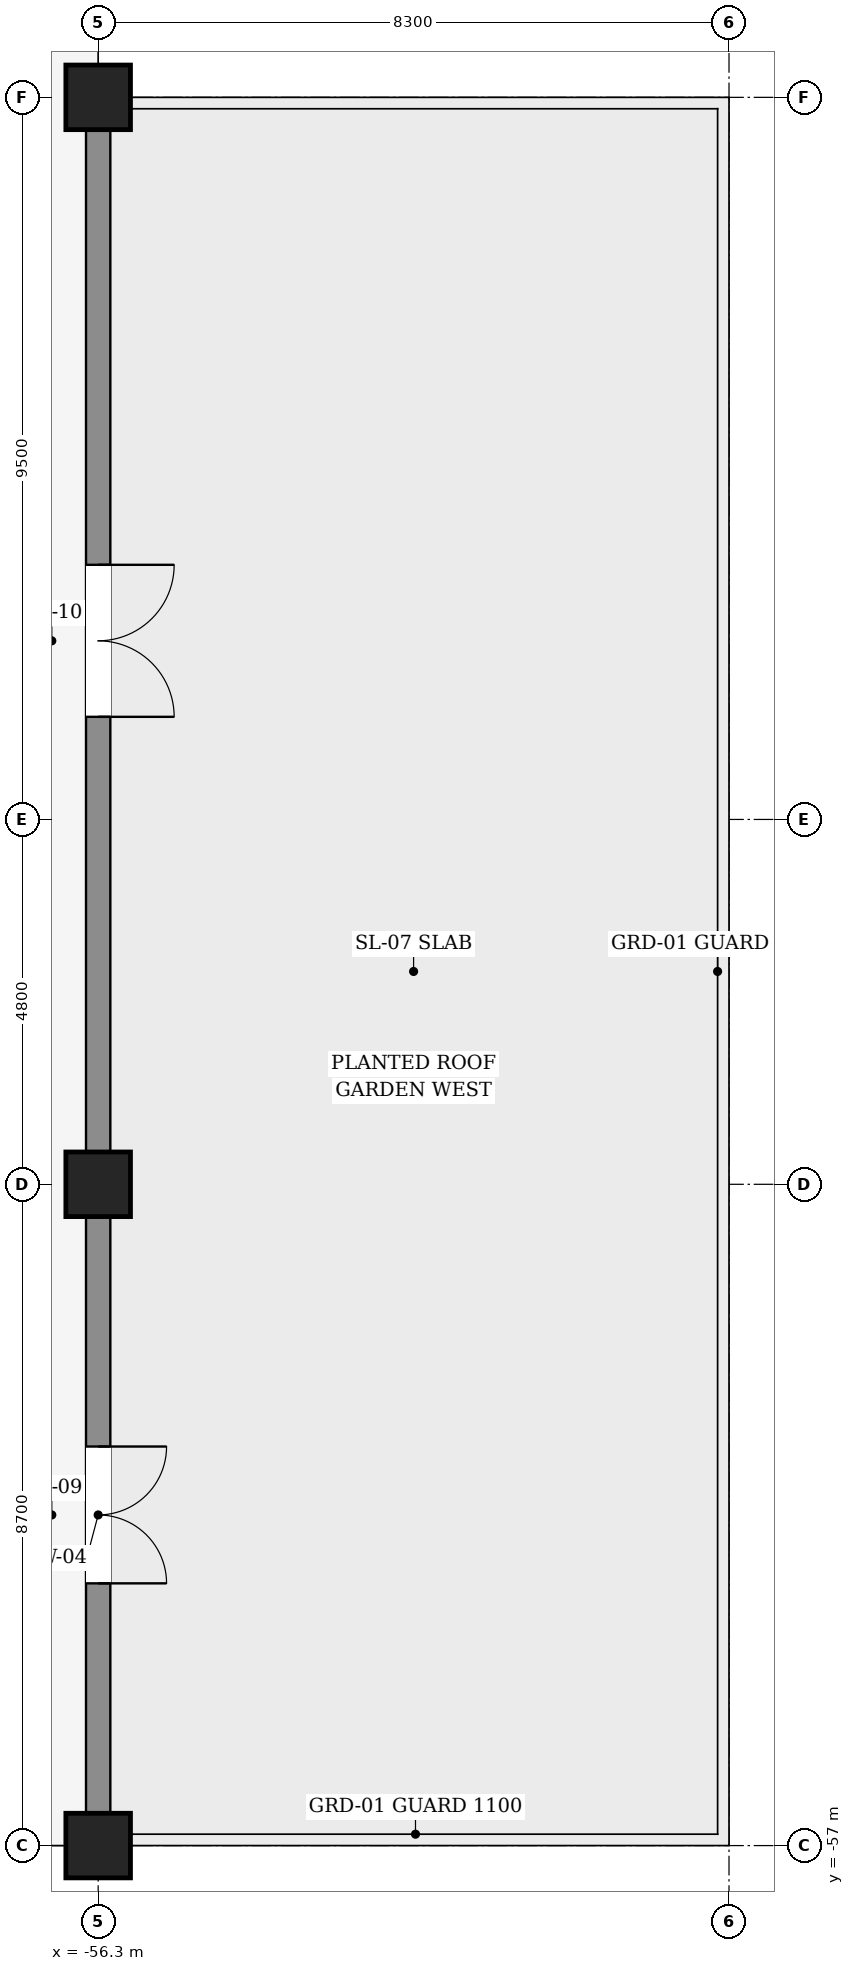
"""IFC4 building model, lengths in metres.
Left out: names, types, materials, properties, quantities, classifications, styles, units other than length and angle.
Written with IfcOpenShell. Run it as: python <this file> out.ifc"""

import sys

from ifc_helpers import new_model, si_unit, direction, frame, frame_2d, origin, origin_2d, place, context, subcontext, project, spatial, rectangle, extrude, element, fill, save


model = new_model("IFC4")
c1 = context("Model", 3, precision=1e-05, world=origin(), true_north=direction((0.0, 1.0)))
c2 = subcontext(c1, "Body", "Model", "MODEL_VIEW")
j1 = project(units=[si_unit("LENGTHUNIT", "METRE"), si_unit("PLANEANGLEUNIT", "RADIAN")], contexts=[c1])
p1 = place(None, origin())
s1 = spatial("IfcSite", under=j1, at=p1, CompositionType="ELEMENT")
p2 = place(p1, origin())
s2 = spatial("IfcBuilding", under=s1, at=p2, CompositionType="ELEMENT")
p3 = place(p2, frame((0.0, 0.0, 16.2)))
s3 = spatial("IfcBuildingStorey", under=s2, at=p3, CompositionType="ELEMENT", Elevation=16.2)
for number, where, z_axis, x_axis in (
    (1, (-56.3, -57.0, 0.0), (0.0, 0.0, 1.0), (1.0, 0.0, 0.0)),
    (2, (-56.3, -48.3, 0.0), (0.0, 0.0, 1.0), (1.0, 0.0, 0.0)),
    (3, (-56.3, -34.0, 0.0), (0.0, 0.0, 1.0), (1.0, 0.0, 0.0)),
):
    element("IfcColumn", number, at=place(p3, frame(where, z_axis=z_axis, x_axis=x_axis)), inside=s3, PredefinedType="COLUMN", context=c2, shape_type="SweptSolid", body=[
        extrude(rectangle(XDim=0.85, YDim=0.85, at=origin_2d()), origin(), (0.0, 0.0, 1.0), 4.8),
    ])
p4 = place(p3, frame((-56.3, -48.707, 0.0), z_axis=(0.0, 0.0, 1.0), x_axis=(0.0, -1.0, 0.0)))
e4 = element("IfcWall", 4, at=p4, inside=s3, PredefinedType="SOLIDWALL", context=c2, shape_type="SweptSolid", body=[
    extrude(rectangle(XDim=7.886, YDim=0.32, at=frame_2d((3.943, 0.0))), origin(), (0.0, 0.0, 1.0), 3.8),
])
p5 = place(p4, frame((3.043, 0.0, 0.0)))
e5 = element("IfcOpeningElement", 5, at=p5, cuts=e4, PredefinedType="OPENING", context=c2, shape_type="SweptSolid", body=[
    extrude(rectangle(XDim=1.8, YDim=2.4, at=frame_2d((0.9, 1.2))), frame((0.0, 0.17, 0.0), z_axis=(0.0, -1.0, 0.0), x_axis=(1.0, 0.0, 0.0)), (0.0, 0.0, 1.0), 0.34),
])
p6 = place(p3, frame((-56.3, -34.407, 0.0), z_axis=(0.0, 0.0, 1.0), x_axis=(0.0, -1.0, 0.0)))
e6 = element("IfcWall", 6, at=p6, inside=s3, PredefinedType="SOLIDWALL", context=c2, shape_type="SweptSolid", body=[
    extrude(rectangle(XDim=13.486, YDim=0.32, at=frame_2d((6.743, 0.0))), origin(), (0.0, 0.0, 1.0), 3.977),
])
p7 = place(p6, frame((5.743, 0.0, 0.0)))
e7 = element("IfcOpeningElement", 7, at=p7, cuts=e6, PredefinedType="OPENING", context=c2, shape_type="SweptSolid", body=[
    extrude(rectangle(XDim=2.0, YDim=2.4, at=frame_2d((1.0, 1.2))), frame((0.0, 0.17, 0.0), z_axis=(0.0, -1.0, 0.0), x_axis=(1.0, 0.0, 0.0)), (0.0, 0.0, 1.0), 0.34),
])
p8 = place(p5, origin())
e8 = element("IfcDoor", 8, at=p8, inside=s3, OperationType="DOUBLE_DOOR_SINGLE_SWING", PredefinedType="DOOR", context=c2, shape_type="SweptSolid", body=[
    extrude(rectangle(XDim=1.8, YDim=2.4, at=frame_2d((0.9, 1.2))), frame((0.0, 0.025, 0.0), z_axis=(0.0, -1.0, 0.0), x_axis=(1.0, 0.0, 0.0)), (0.0, 0.0, 1.0), 0.05),
])
fill(e5, e8)
p9 = place(p7, origin())
e9 = element("IfcDoor", 9, at=p9, inside=s3, OperationType="DOUBLE_DOOR_SINGLE_SWING", PredefinedType="DOOR", context=c2, shape_type="SweptSolid", body=[
    extrude(rectangle(XDim=2.0, YDim=2.4, at=frame_2d((1.0, 1.2))), frame((0.0, 0.025, 0.0), z_axis=(0.0, -1.0, 0.0), x_axis=(1.0, 0.0, 0.0)), (0.0, 0.0, 1.0), 0.05),
])
fill(e7, e9)
save(model, sys.argv[1])
